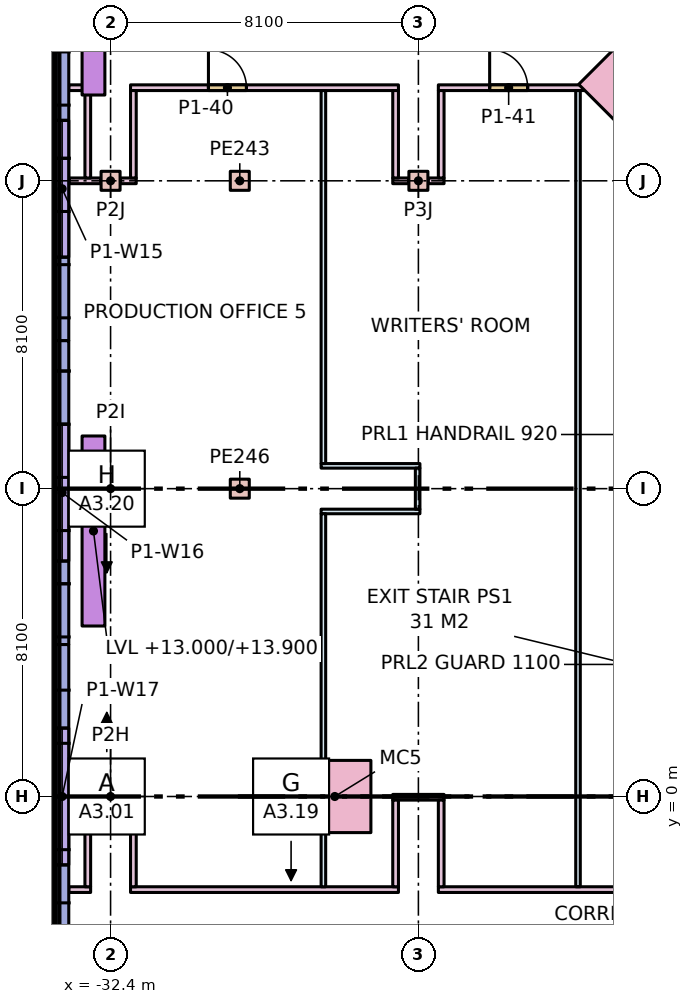
"""IFC4 building model, lengths in metres.
Left out: names, types, materials, properties, quantities, classifications, styles, units other than length and angle.
Written with IfcOpenShell. Run it as: python <this file> out.ifc"""

import sys

from ifc_helpers import new_model, si_unit, direction, frame, frame_2d, origin, origin_2d, place, context, subcontext, project, spatial, rectangle, extrude, element, fill, save


model = new_model("IFC4")
c1 = context("Model", 3, precision=1e-05, world=origin(), true_north=direction((0.0, 1.0)))
c2 = subcontext(c1, "Body", "Model", "MODEL_VIEW")
j1 = project(units=[si_unit("LENGTHUNIT", "METRE"), si_unit("PLANEANGLEUNIT", "RADIAN")], contexts=[c1])
p1 = place(None, origin())
s1 = spatial("IfcSite", under=j1, at=p1, CompositionType="ELEMENT")
p2 = place(p1, origin())
s2 = spatial("IfcBuilding", under=s1, at=p2, CompositionType="ELEMENT")
p3 = place(p2, frame((0.0, 0.0, 6.0)))
s3 = spatial("IfcBuildingStorey", under=s2, at=p3, CompositionType="ELEMENT", Elevation=6.0)
for number, where, z_axis, x_axis in (
    (1, (-32.4, 0.0, 0.0), (0.0, 0.0, 1.0), (1.0, 0.0, 0.0)),
    (2, (-32.4, 8.1, 0.0), (0.0, 0.0, 1.0), (1.0, 0.0, 0.0)),
    (3, (-32.4, 16.2, 0.0), (0.0, 0.0, 1.0), (1.0, 0.0, 0.0)),
    (4, (-24.3, 16.2, 0.0), (0.0, 0.0, 1.0), (1.0, 0.0, 0.0)),
    (5, (-29.0, 16.2, 0.0), (0.0, 0.0, 1.0), (1.0, 0.0, 0.0)),
    (6, (-29.0, 8.1, 0.0), (0.0, 0.0, 1.0), (1.0, 0.0, 0.0)),
):
    element("IfcColumn", number, at=place(p3, frame(where, z_axis=z_axis, x_axis=x_axis)), inside=s3, PredefinedType="COLUMN", context=c2, shape_type="SweptSolid", body=[
        extrude(rectangle(XDim=0.5, YDim=0.5, at=origin_2d()), origin(), (0.0, 0.0, 1.0), 7.0),
    ])
for number, where, z_axis, x_axis in (
    (7, (-18.738, 18.738, 0.0), (0.0, 0.0, 1.0), (-0.707, -0.707, 0.0)),
    (8, (-26.5, 0.0, 0.0), (0.0, 0.0, 1.0), (0.0, -1.0, 0.0)),
):
    element("IfcColumn", number, at=place(p3, frame(where, z_axis=z_axis, x_axis=x_axis)), inside=s3, PredefinedType="COLUMN", context=c2, shape_type="SweptSolid", body=[
        extrude(rectangle(XDim=1.9, YDim=1.9, at=origin_2d()), origin(), (0.0, 0.0, 1.0), 7.0),
    ])
p4 = place(p3, frame((-33.675, 19.989, 0.0), z_axis=(0.0, 0.0, 1.0), x_axis=(0.0, -1.0, 0.0)))
e9 = element("IfcWall", 9, at=p4, inside=s3, PredefinedType="STANDARD", context=c2, shape_type="SweptSolid", body=[
    extrude(rectangle(XDim=7.995, YDim=0.35, at=frame_2d((3.998, 0.0))), origin(), (0.0, 0.0, 1.0), 6.68),
])
p5 = place(p4, frame((2.198, 0.0, 1.0)))
e10 = element("IfcOpeningElement", 10, at=p5, cuts=e9, PredefinedType="OPENING", context=c2, shape_type="SweptSolid", body=[
    extrude(rectangle(XDim=3.6, YDim=4.0, at=frame_2d((1.8, 2.0))), frame((0.0, 0.185, 0.0), z_axis=(0.0, -1.0, 0.0), x_axis=(1.0, 0.0, 0.0)), (0.0, 0.0, 1.0), 0.37),
])
p6 = place(p3, frame((-33.675, 11.993, 0.0), z_axis=(0.0, 0.0, 1.0), x_axis=(0.0, -1.0, 0.0)))
e11 = element("IfcWall", 11, at=p6, inside=s3, PredefinedType="STANDARD", context=c2, shape_type="SweptSolid", body=[
    extrude(rectangle(XDim=7.995, YDim=0.35, at=frame_2d((3.998, 0.0))), origin(), (0.0, 0.0, 1.0), 6.68),
])
p7 = place(p6, frame((2.198, 0.0, 1.0)))
e12 = element("IfcOpeningElement", 12, at=p7, cuts=e11, PredefinedType="OPENING", context=c2, shape_type="SweptSolid", body=[
    extrude(rectangle(XDim=3.6, YDim=4.0, at=frame_2d((1.8, 2.0))), frame((0.0, 0.185, 0.0), z_axis=(0.0, -1.0, 0.0), x_axis=(1.0, 0.0, 0.0)), (0.0, 0.0, 1.0), 0.37),
])
p8 = place(p3, frame((-33.675, 3.998, 0.0), z_axis=(0.0, 0.0, 1.0), x_axis=(0.0, -1.0, 0.0)))
e13 = element("IfcWall", 13, at=p8, inside=s3, PredefinedType="STANDARD", context=c2, shape_type="SweptSolid", body=[
    extrude(rectangle(XDim=7.996, YDim=0.35, at=frame_2d((3.998, 0.0))), origin(), (0.0, 0.0, 1.0), 6.68),
])
p9 = place(p8, frame((2.198, 0.0, 1.0)))
e14 = element("IfcOpeningElement", 14, at=p9, cuts=e13, PredefinedType="OPENING", context=c2, shape_type="SweptSolid", body=[
    extrude(rectangle(XDim=3.6, YDim=4.0, at=frame_2d((1.8, 2.0))), frame((0.0, 0.185, 0.0), z_axis=(0.0, -1.0, 0.0), x_axis=(1.0, 0.0, 0.0)), (0.0, 0.0, 1.0), 0.37),
])
for number, where, z_axis, x_axis in (
    (15, (-32.85, 23.458, 7.0), (0.0, 0.0, 1.0), (0.0, -1.0, 0.0)),
    (16, (-32.85, 9.486, 7.0), (0.0, 0.0, 1.0), (0.0, -1.0, 0.0)),
):
    element("IfcWall", number, at=place(p3, frame(where, z_axis=z_axis, x_axis=x_axis)), inside=s3, PredefinedType="PARAPET", context=c2, shape_type="SweptSolid", body=[
        extrude(rectangle(XDim=5.0, YDim=0.6, at=frame_2d((2.5, 0.0))), origin(), (0.0, 0.0, 1.0), 0.9),
    ])
p10 = place(p3, frame((-33.49, 16.2, 0.0), z_axis=(0.0, 0.0, 1.0), x_axis=(1.0, 0.0, 0.0)))
e17 = element("IfcWall", 17, at=p10, inside=s3, PredefinedType="PARTITIONING", context=c2, shape_type="SweptSolid", body=[
    extrude(rectangle(XDim=0.83, YDim=0.15, at=frame_2d((0.415, 0.0))), origin(), (0.0, 0.0, 1.0), 6.68),
])
p11 = place(p3, frame((-32.14, 16.2, 0.0), z_axis=(0.0, 0.0, 1.0), x_axis=(1.0, 0.0, 0.0)))
e18 = element("IfcWall", 18, at=p11, inside=s3, PredefinedType="PARTITIONING", context=c2, shape_type="SweptSolid", body=[
    extrude(rectangle(XDim=0.415, YDim=0.15, at=frame_2d((0.208, 0.0))), origin(), (0.0, 0.0, 1.0), 6.68),
])
p12 = place(p3, frame((-33.5, 18.65, 0.0), z_axis=(0.0, 0.0, 1.0), x_axis=(1.0, 0.0, 0.0)))
e19 = element("IfcWall", 19, at=p12, inside=s3, PredefinedType="PARTITIONING", context=c2, shape_type="SweptSolid", body=[
    extrude(rectangle(XDim=0.575, YDim=0.15, at=frame_2d((0.288, 0.0))), origin(), (0.0, 0.0, 1.0), 6.68),
])
p13 = place(p3, frame((-31.875, 18.65, 0.0), z_axis=(0.0, 0.0, 1.0), x_axis=(1.0, 0.0, 0.0)))
e20 = element("IfcWall", 20, at=p13, inside=s3, PredefinedType="PARTITIONING", context=c2, shape_type="SweptSolid", body=[
    extrude(rectangle(XDim=7.05, YDim=0.15, at=frame_2d((3.525, 0.0))), origin(), (0.0, 0.0, 1.0), 6.68),
])
p14 = place(p13, frame((2.05, 0.0, 0.0)))
e21 = element("IfcOpeningElement", 21, at=p14, cuts=e20, PredefinedType="OPENING", context=c2, shape_type="SweptSolid", body=[
    extrude(rectangle(XDim=1.0, YDim=2.1, at=frame_2d((0.5, 1.05))), frame((0.0, 0.085, 0.0), z_axis=(0.0, -1.0, 0.0), x_axis=(1.0, 0.0, 0.0)), (0.0, 0.0, 1.0), 0.17),
])
for number, where, z_axis, x_axis in (
    (22, (-33.0, 16.275, 0.0), (0.0, 0.0, 1.0), (0.0, 1.0, 0.0)),
    (23, (-31.8, 16.275, 0.0), (0.0, 0.0, 1.0), (0.0, 1.0, 0.0)),
):
    element("IfcWall", number, at=place(p3, frame(where, z_axis=z_axis, x_axis=x_axis)), inside=s3, PredefinedType="PARTITIONING", context=c2, shape_type="SweptSolid", body=[
        extrude(rectangle(XDim=2.3, YDim=0.15, at=frame_2d((1.15, 0.0))), origin(), (0.0, 0.0, 1.0), 6.68),
    ])
for number, where, z_axis, x_axis in (
    (24, (-24.975, 16.2, 0.0), (0.0, 0.0, 1.0), (1.0, 0.0, 0.0)),
    (25, (-24.04, 16.2, 0.0), (0.0, 0.0, 1.0), (1.0, 0.0, 0.0)),
):
    element("IfcWall", number, at=place(p3, frame(where, z_axis=z_axis, x_axis=x_axis)), inside=s3, PredefinedType="PARTITIONING", context=c2, shape_type="SweptSolid", body=[
        extrude(rectangle(XDim=0.415, YDim=0.15, at=frame_2d((0.208, 0.0))), origin(), (0.0, 0.0, 1.0), 6.68),
    ])
p15 = place(p3, frame((-23.775, 18.65, 0.0), z_axis=(0.0, 0.0, 1.0), x_axis=(1.0, 0.0, 0.0)))
e26 = element("IfcWall", 26, at=p15, inside=s3, PredefinedType="PARTITIONING", context=c2, shape_type="SweptSolid", body=[
    extrude(rectangle(XDim=4.077, YDim=0.15, at=frame_2d((2.038, 0.0))), origin(), (0.0, 0.0, 1.0), 6.68),
])
p16 = place(p15, frame((1.35, 0.0, 0.0)))
e27 = element("IfcOpeningElement", 27, at=p16, cuts=e26, PredefinedType="OPENING", context=c2, shape_type="SweptSolid", body=[
    extrude(rectangle(XDim=1.0, YDim=2.1, at=frame_2d((0.5, 1.05))), frame((0.0, 0.085, 0.0), z_axis=(0.0, -1.0, 0.0), x_axis=(1.0, 0.0, 0.0)), (0.0, 0.0, 1.0), 0.17),
])
for number, where, z_axis, x_axis in (
    (28, (-24.9, 16.275, 0.0), (0.0, 0.0, 1.0), (0.0, 1.0, 0.0)),
    (29, (-23.7, 16.275, 0.0), (0.0, 0.0, 1.0), (0.0, 1.0, 0.0)),
):
    element("IfcWall", number, at=place(p3, frame(where, z_axis=z_axis, x_axis=x_axis)), inside=s3, PredefinedType="PARTITIONING", context=c2, shape_type="SweptSolid", body=[
        extrude(rectangle(XDim=2.3, YDim=0.15, at=frame_2d((1.15, 0.0))), origin(), (0.0, 0.0, 1.0), 6.68),
    ])
for number, where, z_axis, x_axis in (
    (30, (-26.86, 7.5, 0.0), (0.0, 0.0, 1.0), (1.0, 0.0, 0.0)),
    (31, (-26.86, 8.7, 0.0), (0.0, 0.0, 1.0), (1.0, 0.0, 0.0)),
):
    element("IfcWall", number, at=place(p3, frame(where, z_axis=z_axis, x_axis=x_axis)), inside=s3, PredefinedType="PARTITIONING", context=c2, shape_type="SweptSolid", body=[
        extrude(rectangle(XDim=2.6, YDim=0.12, at=frame_2d((1.3, 0.0))), origin(), (0.0, 0.0, 1.0), 6.68),
    ])
p17 = place(p3, frame((-26.8, -2.375, 0.0), z_axis=(0.0, 0.0, 1.0), x_axis=(0.0, 1.0, 0.0)))
e32 = element("IfcWall", 32, at=p17, inside=s3, PredefinedType="PARTITIONING", context=c2, shape_type="SweptSolid", body=[
    extrude(rectangle(XDim=1.415, YDim=0.12, at=frame_2d((0.708, 0.0))), origin(), (0.0, 0.0, 1.0), 6.68),
])
p18 = place(p3, frame((-26.8, 0.96, 0.0), z_axis=(0.0, 0.0, 1.0), x_axis=(0.0, 1.0, 0.0)))
e33 = element("IfcWall", 33, at=p18, inside=s3, PredefinedType="PARTITIONING", context=c2, shape_type="SweptSolid", body=[
    extrude(rectangle(XDim=6.48, YDim=0.12, at=frame_2d((3.24, 0.0))), origin(), (0.0, 0.0, 1.0), 6.68),
])
p19 = place(p3, frame((-26.8, 8.76, 0.0), z_axis=(0.0, 0.0, 1.0), x_axis=(0.0, 1.0, 0.0)))
e34 = element("IfcWall", 34, at=p19, inside=s3, PredefinedType="PARTITIONING", context=c2, shape_type="SweptSolid", body=[
    extrude(rectangle(XDim=9.815, YDim=0.12, at=frame_2d((4.907, 0.0))), origin(), (0.0, 0.0, 1.0), 6.68),
])
p20 = place(p3, frame((-24.32, 7.56, 0.0), z_axis=(0.0, 0.0, 1.0), x_axis=(0.0, 1.0, 0.0)))
e35 = element("IfcWall", 35, at=p20, inside=s3, PredefinedType="PARTITIONING", context=c2, shape_type="SweptSolid", body=[
    extrude(rectangle(XDim=1.08, YDim=0.12, at=frame_2d((0.54, 0.0))), origin(), (0.0, 0.0, 1.0), 6.68),
])
p21 = place(p3, frame((-33.5, -2.45, 0.0), z_axis=(0.0, 0.0, 1.0), x_axis=(1.0, 0.0, 0.0)))
e36 = element("IfcWall", 36, at=p21, inside=s3, PredefinedType="PARTITIONING", context=c2, shape_type="SweptSolid", body=[
    extrude(rectangle(XDim=0.575, YDim=0.15, at=frame_2d((0.288, 0.0))), origin(), (0.0, 0.0, 1.0), 6.68),
])
p22 = place(p3, frame((-31.875, -2.45, 0.0), z_axis=(0.0, 0.0, 1.0), x_axis=(1.0, 0.0, 0.0)))
e37 = element("IfcWall", 37, at=p22, inside=s3, PredefinedType="PARTITIONING", context=c2, shape_type="SweptSolid", body=[
    extrude(rectangle(XDim=7.05, YDim=0.15, at=frame_2d((3.525, 0.0))), origin(), (0.0, 0.0, 1.0), 6.68),
])
p23 = place(p3, frame((-33.49, -0.02, 0.0), z_axis=(0.0, 0.0, 1.0), x_axis=(1.0, 0.0, 0.0)))
e38 = element("IfcWall", 38, at=p23, inside=s3, PredefinedType="PARTITIONING", context=c2, shape_type="SweptSolid", body=[
    extrude(rectangle(XDim=0.83, YDim=0.15, at=frame_2d((0.415, 0.0))), origin(), (0.0, 0.0, 1.0), 6.68),
])
p24 = place(p3, frame((-32.14, -0.02, 0.0), z_axis=(0.0, 0.0, 1.0), x_axis=(1.0, 0.0, 0.0)))
e39 = element("IfcWall", 39, at=p24, inside=s3, PredefinedType="PARTITIONING", context=c2, shape_type="SweptSolid", body=[
    extrude(rectangle(XDim=0.415, YDim=0.15, at=frame_2d((0.208, 0.0))), origin(), (0.0, 0.0, 1.0), 6.68),
])
for number, where, z_axis, x_axis in (
    (40, (-33.0, -2.375, 0.0), (0.0, 0.0, 1.0), (0.0, 1.0, 0.0)),
    (41, (-31.8, -2.375, 0.0), (0.0, 0.0, 1.0), (0.0, 1.0, 0.0)),
):
    element("IfcWall", number, at=place(p3, frame(where, z_axis=z_axis, x_axis=x_axis)), inside=s3, PredefinedType="PARTITIONING", context=c2, shape_type="SweptSolid", body=[
        extrude(rectangle(XDim=2.28, YDim=0.15, at=frame_2d((1.14, 0.0))), origin(), (0.0, 0.0, 1.0), 6.68),
    ])
p25 = place(p3, frame((-20.1, -2.375, 0.0), z_axis=(0.0, 0.0, 1.0), x_axis=(0.0, 1.0, 0.0)))
e42 = element("IfcWall", 42, at=p25, inside=s3, PredefinedType="PARTITIONING", context=c2, shape_type="SweptSolid", body=[
    extrude(rectangle(XDim=20.95, YDim=0.12, at=frame_2d((10.475, 0.0))), origin(), (0.0, 0.0, 1.0), 6.68),
])
p26 = place(p3, frame((-23.775, -2.45, 0.0), z_axis=(0.0, 0.0, 1.0), x_axis=(1.0, 0.0, 0.0)))
e43 = element("IfcWall", 43, at=p26, inside=s3, PredefinedType="PARTITIONING", context=c2, shape_type="SweptSolid", body=[
    extrude(rectangle(XDim=10.45, YDim=0.15, at=frame_2d((5.225, 0.0))), origin(), (0.0, 0.0, 1.0), 6.68),
])
p27 = place(p3, frame((-24.975, -0.02, 0.0), z_axis=(0.0, 0.0, 1.0), x_axis=(1.0, 0.0, 0.0)))
e44 = element("IfcWall", 44, at=p27, inside=s3, PredefinedType="PARTITIONING", context=c2, shape_type="SweptSolid", body=[
    extrude(rectangle(XDim=1.35, YDim=0.15, at=frame_2d((0.675, 0.0))), origin(), (0.0, 0.0, 1.0), 6.68),
])
for number, where, z_axis, x_axis in (
    (45, (-24.9, -2.375, 0.0), (0.0, 0.0, 1.0), (0.0, 1.0, 0.0)),
    (46, (-23.7, -2.375, 0.0), (0.0, 0.0, 1.0), (0.0, 1.0, 0.0)),
):
    element("IfcWall", number, at=place(p3, frame(where, z_axis=z_axis, x_axis=x_axis)), inside=s3, PredefinedType="PARTITIONING", context=c2, shape_type="SweptSolid", body=[
        extrude(rectangle(XDim=2.28, YDim=0.15, at=frame_2d((1.14, 0.0))), origin(), (0.0, 0.0, 1.0), 6.68),
    ])
p28 = place(p5, origin())
e47 = element("IfcWindow", 47, at=p28, inside=s3, PartitioningType="SINGLE_PANEL", PredefinedType="WINDOW", context=c2, shape_type="SweptSolid", body=[
    extrude(rectangle(XDim=3.6, YDim=4.0, at=frame_2d((1.8, 2.0))), frame((0.0, 0.03, 0.0), z_axis=(0.0, -1.0, 0.0), x_axis=(1.0, 0.0, 0.0)), (0.0, 0.0, 1.0), 0.06),
])
fill(e10, e47)
p29 = place(p7, origin())
e48 = element("IfcWindow", 48, at=p29, inside=s3, PartitioningType="SINGLE_PANEL", PredefinedType="WINDOW", context=c2, shape_type="SweptSolid", body=[
    extrude(rectangle(XDim=3.6, YDim=4.0, at=frame_2d((1.8, 2.0))), frame((0.0, 0.03, 0.0), z_axis=(0.0, -1.0, 0.0), x_axis=(1.0, 0.0, 0.0)), (0.0, 0.0, 1.0), 0.06),
])
fill(e12, e48)
p30 = place(p9, origin())
e49 = element("IfcWindow", 49, at=p30, inside=s3, PartitioningType="SINGLE_PANEL", PredefinedType="WINDOW", context=c2, shape_type="SweptSolid", body=[
    extrude(rectangle(XDim=3.6, YDim=4.0, at=frame_2d((1.8, 2.0))), frame((0.0, 0.03, 0.0), z_axis=(0.0, -1.0, 0.0), x_axis=(1.0, 0.0, 0.0)), (0.0, 0.0, 1.0), 0.06),
])
fill(e14, e49)
p31 = place(p14, origin())
e50 = element("IfcDoor", 50, at=p31, inside=s3, OperationType="SINGLE_SWING_LEFT", PredefinedType="DOOR", context=c2, shape_type="SweptSolid", body=[
    extrude(rectangle(XDim=1.0, YDim=2.1, at=frame_2d((0.5, 1.05))), frame((0.0, 0.025, 0.0), z_axis=(0.0, -1.0, 0.0), x_axis=(1.0, 0.0, 0.0)), (0.0, 0.0, 1.0), 0.05),
])
fill(e21, e50)
p32 = place(p16, origin())
e51 = element("IfcDoor", 51, at=p32, inside=s3, OperationType="SINGLE_SWING_LEFT", PredefinedType="DOOR", context=c2, shape_type="SweptSolid", body=[
    extrude(rectangle(XDim=1.0, YDim=2.1, at=frame_2d((0.5, 1.05))), frame((0.0, 0.025, 0.0), z_axis=(0.0, -1.0, 0.0), x_axis=(1.0, 0.0, 0.0)), (0.0, 0.0, 1.0), 0.05),
])
fill(e27, e51)
save(model, sys.argv[1])
